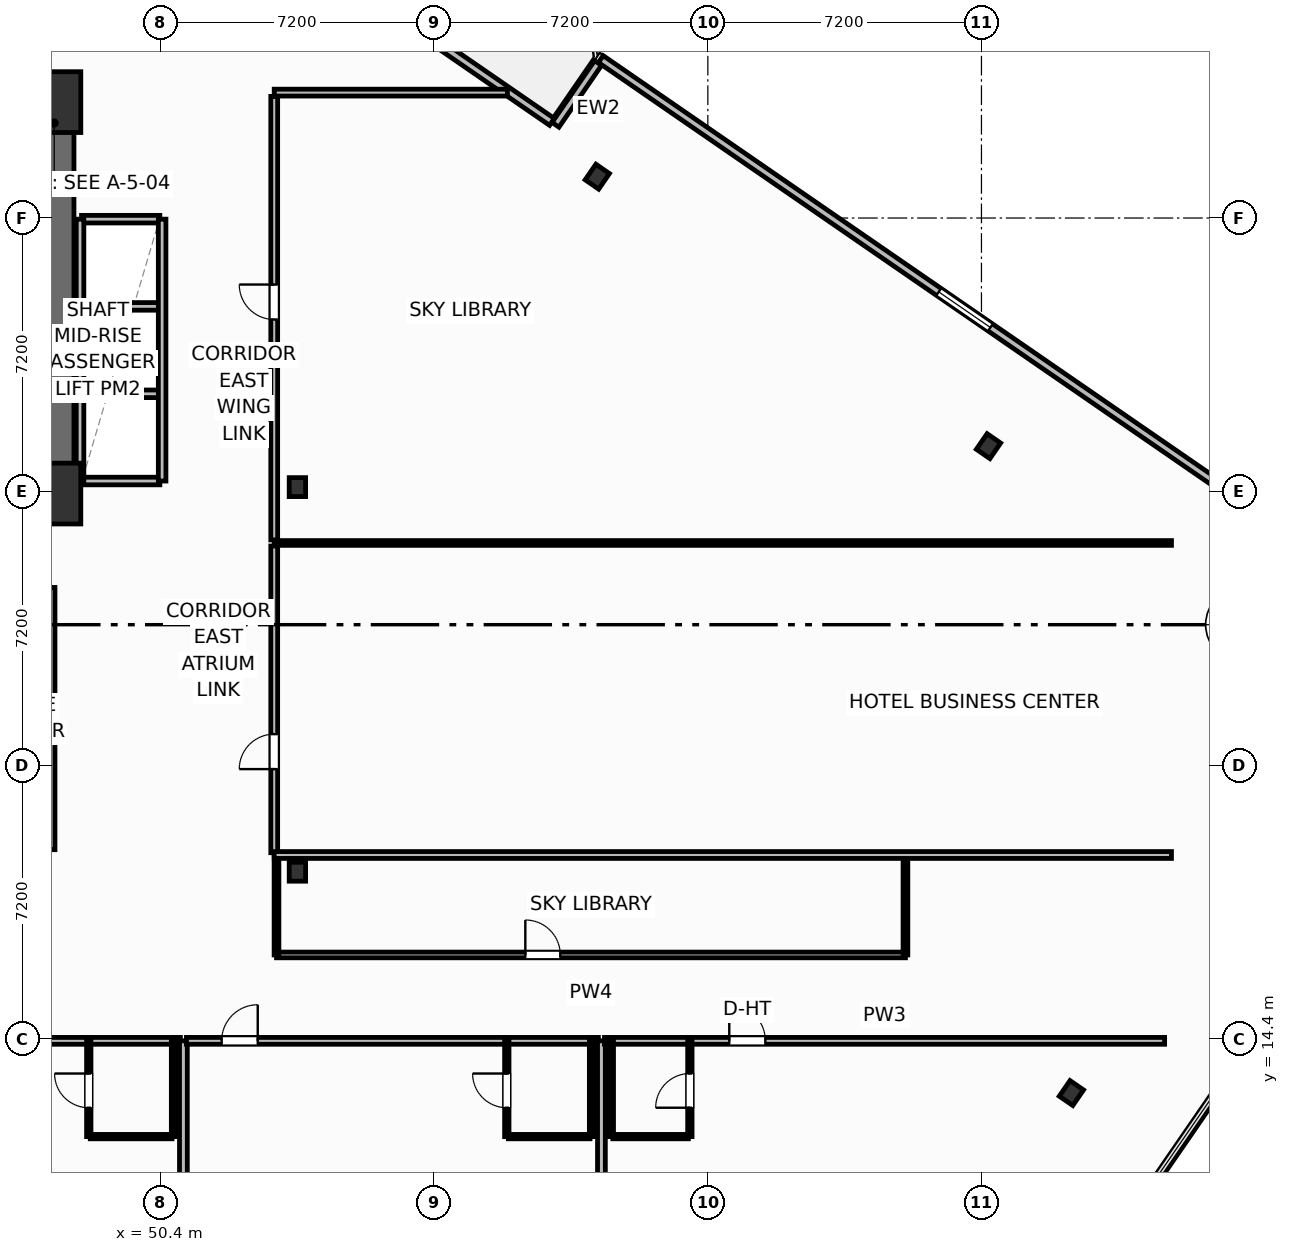
"""IFC4 building model, lengths in metres.
Left out: names, types, materials, properties, quantities, classifications, styles, units other than length and angle.
Written with IfcOpenShell. Run it as: python <this file> out.ifc"""

import sys

from ifc_helpers import new_model, si_unit, direction, frame, frame_2d, origin, origin_2d, place, context, subcontext, project, spatial, rectangle, i_section, extrude, element, fill, save


model = new_model("IFC4")
c1 = context("Model", 3, precision=1e-05, world=origin(), true_north=direction((0.0, 1.0)))
c2 = subcontext(c1, "Body", "Model", "MODEL_VIEW")
j1 = project(units=[si_unit("LENGTHUNIT", "METRE"), si_unit("PLANEANGLEUNIT", "RADIAN")], contexts=[c1])
p1 = place(None, origin())
s1 = spatial("IfcSite", under=j1, at=p1, CompositionType="ELEMENT")
p2 = place(p1, origin())
s2 = spatial("IfcBuilding", under=s1, at=p2, CompositionType="ELEMENT")
p3 = place(p2, frame((0.0, 0.0, 45.5)))
s3 = spatial("IfcBuildingStorey", under=s2, at=p3, CompositionType="ELEMENT", Elevation=45.5)
for number, where, z_axis, x_axis in (
    (1, (47.7, 28.75, 0.0), (0.0, 0.0, 1.0), (1.0, 0.0, 0.0)),
    (2, (47.7, 39.05, 0.0), (0.0, 0.0, 1.0), (1.0, 0.0, 0.0)),
):
    element("IfcColumn", number, at=place(p3, frame(where, z_axis=z_axis, x_axis=x_axis)), inside=s3, PredefinedType="COLUMN", context=c2, shape_type="SweptSolid", body=[
        extrude(rectangle(XDim=1.2, YDim=1.6, at=origin_2d()), origin(), (0.0, 0.0, 1.0), 3.7),
    ])
for number, where, z_axis, x_axis in (
    (3, (54.0, 18.8, 0.0), (0.0, 0.0, 1.0), (1.0, 0.0, 0.0)),
    (4, (54.0, 28.92, 0.0), (0.0, 0.0, 1.0), (1.0, 0.0, 0.0)),
):
    element("IfcColumn", number, at=place(p3, frame(where, z_axis=z_axis, x_axis=x_axis)), inside=s3, PredefinedType="COLUMN", context=c2, shape_type="SweptSolid", body=[
        extrude(i_section(OverallWidth=0.432, OverallDepth=0.498, WebThickness=0.056, FlangeThickness=0.089, FilletRadius=0.025, at=origin_2d()), origin(), (0.0, 0.0, 1.0), 3.7),
    ])
p4 = place(p3, frame((30.28, 38.845, 0.0), z_axis=(0.0, 0.0, 1.0), x_axis=(1.0, 0.0, 0.0)))
e5 = element("IfcWall", 5, at=p4, inside=s3, PredefinedType="SHEAR", context=c2, shape_type="SweptSolid", body=[
    extrude(rectangle(XDim=17.84, YDim=0.85, at=frame_2d((8.92, 0.0))), origin(), (0.0, 0.0, 1.0), 3.45),
])
p5 = place(p3, frame((47.695, 29.2, 0.0), z_axis=(0.0, 0.0, 1.0), x_axis=(0.0, 1.0, 0.0)))
e6 = element("IfcWall", 6, at=p5, inside=s3, PredefinedType="SHEAR", context=c2, shape_type="SweptSolid", body=[
    extrude(rectangle(XDim=9.22, YDim=0.85, at=frame_2d((4.61, 0.0))), origin(), (0.0, 0.0, 1.0), 3.45),
])
p6 = place(p3, frame((43.6, 28.775, 0.0), z_axis=(0.0, 0.0, 1.0), x_axis=(1.0, 0.0, 0.0)))
e7 = element("IfcWall", 7, at=p6, inside=s3, PredefinedType="SHEAR", context=c2, shape_type="SweptSolid", body=[
    extrude(rectangle(XDim=4.52, YDim=0.85, at=frame_2d((2.26, 0.0))), origin(), (0.0, 0.0, 1.0), 3.45),
])
for number, where, z_axis, x_axis in (
    (8, (74.367, 12.976, 0.0), (0.0, 0.0, 1.0), (0.824, -0.567, 0.0)),
    (9, (72.186, 29.997, 0.0), (0.0, 0.0, 1.0), (0.824, -0.567, 0.0)),
    (10, (61.891, 37.088, 0.0), (0.0, 0.0, 1.0), (0.824, -0.567, 0.0)),
):
    element("IfcColumn", number, at=place(p3, frame(where, z_axis=z_axis, x_axis=x_axis)), inside=s3, PredefinedType="COLUMN", context=c2, shape_type="SweptSolid", body=[
        extrude(i_section(OverallWidth=0.432, OverallDepth=0.498, WebThickness=0.056, FlangeThickness=0.089, FilletRadius=0.025, at=origin_2d()), origin(), (0.0, 0.0, 1.0), 3.7),
    ])
p7 = place(p3, frame((55.757, 41.933, 0.0), z_axis=(0.0, 0.0, 1.0), x_axis=(0.823534636215, -0.567265989598, 0.0)))
e11 = element("IfcWall", 11, at=p7, inside=s3, PredefinedType="SOLIDWALL", context=c2, shape_type="SweptSolid", body=[
    extrude(rectangle(XDim=6.0, YDim=0.22, at=frame_2d((3.0, 0.0))), origin(), (0.0, 0.0, 1.0), 2.73),
])
p8 = place(p7, frame((0.4, 0.0, 0.0)))
e12 = element("IfcOpeningElement", 12, at=p8, cuts=e11, PredefinedType="OPENING", context=c2, shape_type="SweptSolid", body=[
    extrude(rectangle(XDim=1.5, YDim=2.25, at=frame_2d((0.75, 1.125))), frame((0.0, 0.12, 0.0), z_axis=(0.0, -1.0, 0.0), x_axis=(1.0, 0.0, 0.0)), (0.0, 0.0, 1.0), 0.24),
])
p9 = place(p3, frame((81.127, 26.995, 0.0), z_axis=(0.0, 0.0, 1.0), x_axis=(-0.823530169317, 0.567272474411, 0.0)))
e13 = element("IfcWall", 13, at=p9, inside=s3, PredefinedType="SOLIDWALL", context=c2, shape_type="SweptSolid", body=[
    extrude(rectangle(XDim=23.247, YDim=0.22, at=frame_2d((11.624, 0.0))), origin(), (0.0, 0.0, 1.0), 2.73),
])
p10 = place(p9, frame((10.799, 0.0, 0.8)))
e14 = element("IfcOpeningElement", 14, at=p10, cuts=e13, PredefinedType="OPENING", context=c2, shape_type="SweptSolid", body=[
    extrude(rectangle(XDim=1.65, YDim=1.65, at=frame_2d((0.825, 0.825))), frame((0.0, 0.12, 0.0), z_axis=(0.0, -1.0, 0.0), x_axis=(1.0, 0.0, 0.0)), (0.0, 0.0, 1.0), 0.24),
])
p11 = place(p3, frame((61.912, 40.079, 0.0), z_axis=(0.0, 0.0, 1.0), x_axis=(-0.567189720735, -0.82358716642, 0.0)))
e15 = element("IfcWall", 15, at=p11, inside=s3, PredefinedType="SOLIDWALL", context=c2, shape_type="SweptSolid", body=[
    extrude(rectangle(XDim=1.975, YDim=0.22, at=frame_2d((0.987, 0.0))), origin(), (0.0, 0.0, 1.0), 2.73),
])
p12 = place(p3, frame((53.45, 16.61, 0.0), z_axis=(0.0, 0.0, 1.0), x_axis=(1.0, 0.0, 0.0)))
e16 = element("IfcWall", 16, at=p12, inside=s3, PredefinedType="PARTITIONING", context=c2, shape_type="SweptSolid", body=[
    extrude(rectangle(XDim=16.55, YDim=0.15, at=frame_2d((8.275, 0.0))), origin(), (0.0, 0.0, 1.0), 2.58),
])
p13 = place(p12, frame((6.548, 0.0, 0.0)))
e17 = element("IfcOpeningElement", 17, at=p13, cuts=e16, PredefinedType="OPENING", context=c2, shape_type="SweptSolid", body=[
    extrude(rectangle(XDim=0.92, YDim=2.05, at=frame_2d((0.46, 1.025))), frame((0.0, 0.085, 0.0), z_axis=(0.0, -1.0, 0.0), x_axis=(1.0, 0.0, 0.0)), (0.0, 0.0, 1.0), 0.17),
])
for number, where, z_axis, x_axis in (
    (18, (53.45, 16.61, 0.0), (0.0, 0.0, 1.0), (0.0, 1.0, 0.0)),
    (19, (70.0, 16.61, 0.0), (0.0, 0.0, 1.0), (0.0, 1.0, 0.0)),
):
    element("IfcWall", number, at=place(p3, frame(where, z_axis=z_axis, x_axis=x_axis)), inside=s3, PredefinedType="PARTITIONING", context=c2, shape_type="SweptSolid", body=[
        extrude(rectangle(XDim=2.63, YDim=0.125, at=frame_2d((1.315, 0.0))), origin(), (0.0, 0.0, 1.0), 3.45),
    ])
p14 = place(p3, frame((40.08, 14.35, 0.0), z_axis=(0.0, 0.0, 1.0), x_axis=(1.0, 0.0, 0.0)))
e20 = element("IfcWall", 20, at=p14, inside=s3, PredefinedType="PARTITIONING", context=c2, shape_type="SweptSolid", body=[
    extrude(rectangle(XDim=10.84, YDim=0.18, at=frame_2d((5.42, 0.0))), origin(), (0.0, 0.0, 1.0), 3.45),
])
p15 = place(p14, frame((0.926, 0.0, 0.0)))
e21 = element("IfcOpeningElement", 21, at=p15, cuts=e20, PredefinedType="OPENING", context=c2, shape_type="SweptSolid", body=[
    extrude(rectangle(XDim=0.95, YDim=2.15, at=frame_2d((0.475, 1.075))), frame((0.0, 0.1, 0.0), z_axis=(0.0, -1.0, 0.0), x_axis=(1.0, 0.0, 0.0)), (0.0, 0.0, 1.0), 0.2),
])
p16 = place(p3, frame((48.55, 11.83, 0.0), z_axis=(0.0, 0.0, 1.0), x_axis=(1.0, 0.0, 0.0)))
e22 = element("IfcWall", 22, at=p16, inside=s3, PredefinedType="PARTITIONING", context=c2, shape_type="SweptSolid", body=[
    extrude(rectangle(XDim=2.15, YDim=0.115, at=frame_2d((1.075, 0.0))), origin(), (0.0, 0.0, 1.0), 3.45),
])
p17 = place(p3, frame((48.51, 11.83, 0.0), z_axis=(0.0, 0.0, 1.0), x_axis=(0.0, 1.0, 0.0)))
e23 = element("IfcWall", 23, at=p17, inside=s3, PredefinedType="PARTITIONING", context=c2, shape_type="SweptSolid", body=[
    extrude(rectangle(XDim=2.52, YDim=0.115, at=frame_2d((1.26, 0.0))), origin(), (0.0, 0.0, 1.0), 3.45),
])
p18 = place(p17, frame((0.76, 0.0, 0.0)))
e24 = element("IfcOpeningElement", 24, at=p18, cuts=e23, PredefinedType="OPENING", context=c2, shape_type="SweptSolid", body=[
    extrude(rectangle(XDim=0.9, YDim=2.05, at=frame_2d((0.45, 1.025))), frame((0.0, 0.067, 0.0), z_axis=(0.0, -1.0, 0.0), x_axis=(1.0, 0.0, 0.0)), (0.0, 0.0, 1.0), 0.135),
])
p19 = place(p3, frame((50.74, 11.83, 0.0), z_axis=(0.0, 0.0, 1.0), x_axis=(0.0, 1.0, 0.0)))
e25 = element("IfcWall", 25, at=p19, inside=s3, PredefinedType="PARTITIONING", context=c2, shape_type="SweptSolid", body=[
    extrude(rectangle(XDim=2.52, YDim=0.115, at=frame_2d((1.26, 0.0))), origin(), (0.0, 0.0, 1.0), 3.45),
])
p20 = place(p3, frame((51.0, -4.0, 0.0), z_axis=(0.0, 0.0, 1.0), x_axis=(0.0, 1.0, 0.0)))
e26 = element("IfcWall", 26, at=p20, inside=s3, PredefinedType="PARTITIONING", context=c2, shape_type="SweptSolid", body=[
    extrude(rectangle(XDim=18.35, YDim=0.205, at=frame_2d((9.175, 0.0))), origin(), (0.0, 0.0, 1.0), 3.45),
])
p21 = place(p3, frame((51.08, 14.35, 0.0), z_axis=(0.0, 0.0, 1.0), x_axis=(1.0, 0.0, 0.0)))
e27 = element("IfcWall", 27, at=p21, inside=s3, PredefinedType="PARTITIONING", context=c2, shape_type="SweptSolid", body=[
    extrude(rectangle(XDim=10.84, YDim=0.18, at=frame_2d((5.42, 0.0))), origin(), (0.0, 0.0, 1.0), 3.45),
])
p22 = place(p21, frame((0.926, 0.0, 0.0)))
e28 = element("IfcOpeningElement", 28, at=p22, cuts=e27, PredefinedType="OPENING", context=c2, shape_type="SweptSolid", body=[
    extrude(rectangle(XDim=0.95, YDim=2.15, at=frame_2d((0.475, 1.075))), frame((0.0, 0.1, 0.0), z_axis=(0.0, -1.0, 0.0), x_axis=(1.0, 0.0, 0.0)), (0.0, 0.0, 1.0), 0.2),
])
p23 = place(p3, frame((59.55, 11.83, 0.0), z_axis=(0.0, 0.0, 1.0), x_axis=(1.0, 0.0, 0.0)))
e29 = element("IfcWall", 29, at=p23, inside=s3, PredefinedType="PARTITIONING", context=c2, shape_type="SweptSolid", body=[
    extrude(rectangle(XDim=2.15, YDim=0.115, at=frame_2d((1.075, 0.0))), origin(), (0.0, 0.0, 1.0), 3.45),
])
p24 = place(p3, frame((59.51, 11.83, 0.0), z_axis=(0.0, 0.0, 1.0), x_axis=(0.0, 1.0, 0.0)))
e30 = element("IfcWall", 30, at=p24, inside=s3, PredefinedType="PARTITIONING", context=c2, shape_type="SweptSolid", body=[
    extrude(rectangle(XDim=2.52, YDim=0.115, at=frame_2d((1.26, 0.0))), origin(), (0.0, 0.0, 1.0), 3.45),
])
p25 = place(p24, frame((0.76, 0.0, 0.0)))
e31 = element("IfcOpeningElement", 31, at=p25, cuts=e30, PredefinedType="OPENING", context=c2, shape_type="SweptSolid", body=[
    extrude(rectangle(XDim=0.9, YDim=2.05, at=frame_2d((0.45, 1.025))), frame((0.0, 0.067, 0.0), z_axis=(0.0, -1.0, 0.0), x_axis=(1.0, 0.0, 0.0)), (0.0, 0.0, 1.0), 0.135),
])
p26 = place(p3, frame((61.74, 11.83, 0.0), z_axis=(0.0, 0.0, 1.0), x_axis=(0.0, 1.0, 0.0)))
e32 = element("IfcWall", 32, at=p26, inside=s3, PredefinedType="PARTITIONING", context=c2, shape_type="SweptSolid", body=[
    extrude(rectangle(XDim=2.52, YDim=0.115, at=frame_2d((1.26, 0.0))), origin(), (0.0, 0.0, 1.0), 3.45),
])
p27 = place(p3, frame((62.0, -4.0, 0.0), z_axis=(0.0, 0.0, 1.0), x_axis=(0.0, 1.0, 0.0)))
e33 = element("IfcWall", 33, at=p27, inside=s3, PredefinedType="PARTITIONING", context=c2, shape_type="SweptSolid", body=[
    extrude(rectangle(XDim=18.35, YDim=0.205, at=frame_2d((9.175, 0.0))), origin(), (0.0, 0.0, 1.0), 3.45),
])
p28 = place(p3, frame((62.08, 14.35, 0.0), z_axis=(0.0, 0.0, 1.0), x_axis=(1.0, 0.0, 0.0)))
e34 = element("IfcWall", 34, at=p28, inside=s3, PredefinedType="PARTITIONING", context=c2, shape_type="SweptSolid", body=[
    extrude(rectangle(XDim=14.74, YDim=0.18, at=frame_2d((7.37, 0.0))), origin(), (0.0, 0.0, 1.0), 2.58),
])
p29 = place(p28, frame((3.284, 0.0, 0.0)))
e35 = element("IfcOpeningElement", 35, at=p29, cuts=e34, PredefinedType="OPENING", context=c2, shape_type="SweptSolid", body=[
    extrude(rectangle(XDim=0.95, YDim=2.15, at=frame_2d((0.475, 1.075))), frame((0.0, 0.1, 0.0), z_axis=(0.0, -1.0, 0.0), x_axis=(1.0, 0.0, 0.0)), (0.0, 0.0, 1.0), 0.2),
])
p30 = place(p3, frame((62.3, 11.83, 0.0), z_axis=(0.0, 0.0, 1.0), x_axis=(1.0, 0.0, 0.0)))
e36 = element("IfcWall", 36, at=p30, inside=s3, PredefinedType="PARTITIONING", context=c2, shape_type="SweptSolid", body=[
    extrude(rectangle(XDim=1.987, YDim=0.115, at=frame_2d((0.994, 0.0))), origin(), (0.0, 0.0, 1.0), 3.45),
])
p31 = place(p3, frame((64.327, 11.83, 0.0), z_axis=(0.0, 0.0, 1.0), x_axis=(0.0, 1.0, 0.0)))
e37 = element("IfcWall", 37, at=p31, inside=s3, PredefinedType="PARTITIONING", context=c2, shape_type="SweptSolid", body=[
    extrude(rectangle(XDim=2.52, YDim=0.115, at=frame_2d((1.26, 0.0))), origin(), (0.0, 0.0, 1.0), 3.45),
])
p32 = place(p31, frame((0.76, 0.0, 0.0)))
e38 = element("IfcOpeningElement", 38, at=p32, cuts=e37, PredefinedType="OPENING", context=c2, shape_type="SweptSolid", body=[
    extrude(rectangle(XDim=0.9, YDim=2.05, at=frame_2d((0.45, 1.025))), frame((0.0, 0.067, 0.0), z_axis=(0.0, -1.0, 0.0), x_axis=(1.0, 0.0, 0.0)), (0.0, 0.0, 1.0), 0.135),
])
p33 = place(p3, frame((62.26, 11.83, 0.0), z_axis=(0.0, 0.0, 1.0), x_axis=(0.0, 1.0, 0.0)))
e39 = element("IfcWall", 39, at=p33, inside=s3, PredefinedType="PARTITIONING", context=c2, shape_type="SweptSolid", body=[
    extrude(rectangle(XDim=2.52, YDim=0.115, at=frame_2d((1.26, 0.0))), origin(), (0.0, 0.0, 1.0), 3.45),
])
p34 = place(p3, frame((53.39, 19.3, 0.0), z_axis=(0.0, 0.0, 1.0), x_axis=(0.0, 1.0, 0.0)))
e40 = element("IfcWall", 40, at=p34, inside=s3, PredefinedType="PARTITIONING", context=c2, shape_type="SweptSolid", body=[
    extrude(rectangle(XDim=8.07, YDim=0.18, at=frame_2d((4.035, 0.0))), origin(), (0.0, 0.0, 1.0), 3.45),
])
p35 = place(p34, frame((2.2, 0.0, 0.0)))
e41 = element("IfcOpeningElement", 41, at=p35, cuts=e40, PredefinedType="OPENING", context=c2, shape_type="SweptSolid", body=[
    extrude(rectangle(XDim=0.92, YDim=2.05, at=frame_2d((0.46, 1.025))), frame((0.0, 0.1, 0.0), z_axis=(0.0, -1.0, 0.0), x_axis=(1.0, 0.0, 0.0)), (0.0, 0.0, 1.0), 0.2),
])
p36 = place(p3, frame((53.39, 27.53, 0.0), z_axis=(0.0, 0.0, 1.0), x_axis=(0.0, 1.0, 0.0)))
e42 = element("IfcWall", 42, at=p36, inside=s3, PredefinedType="PARTITIONING", context=c2, shape_type="SweptSolid", body=[
    extrude(rectangle(XDim=11.67, YDim=0.18, at=frame_2d((5.835, 0.0))), origin(), (0.0, 0.0, 1.0), 3.45),
])
p37 = place(p36, frame((5.8, 0.0, 0.0)))
e43 = element("IfcOpeningElement", 43, at=p37, cuts=e42, PredefinedType="OPENING", context=c2, shape_type="SweptSolid", body=[
    extrude(rectangle(XDim=0.92, YDim=2.05, at=frame_2d((0.46, 1.025))), frame((0.0, 0.1, 0.0), z_axis=(0.0, -1.0, 0.0), x_axis=(1.0, 0.0, 0.0)), (0.0, 0.0, 1.0), 0.2),
])
p38 = place(p3, frame((53.39, 27.45, 0.0), z_axis=(0.0, 0.0, 1.0), x_axis=(1.0, 0.0, 0.0)))
e44 = element("IfcWall", 44, at=p38, inside=s3, PredefinedType="PARTITIONING", context=c2, shape_type="SweptSolid", body=[
    extrude(rectangle(XDim=23.61, YDim=0.125, at=frame_2d((11.805, 0.0))), origin(), (0.0, 0.0, 1.0), 3.45),
])
p39 = place(p3, frame((53.39, 19.24, 0.0), z_axis=(0.0, 0.0, 1.0), x_axis=(1.0, 0.0, 0.0)))
e45 = element("IfcWall", 45, at=p39, inside=s3, PredefinedType="PARTITIONING", context=c2, shape_type="SweptSolid", body=[
    extrude(rectangle(XDim=23.61, YDim=0.18, at=frame_2d((11.805, 0.0))), origin(), (0.0, 0.0, 1.0), 3.45),
])
p40 = place(p3, frame((53.39, 39.3, 0.0), z_axis=(0.0, 0.0, 1.0), x_axis=(1.0, 0.0, 0.0)))
e46 = element("IfcWall", 46, at=p40, inside=s3, PredefinedType="PARTITIONING", context=c2, shape_type="SweptSolid", body=[
    extrude(rectangle(XDim=6.136, YDim=0.18, at=frame_2d((3.068, 0.0))), origin(), (0.0, 0.0, 1.0), 3.45),
])
for number, where, z_axis, x_axis in (
    (47, (48.32, 31.375, 0.0), (0.0, 0.0, 1.0), (1.0, 0.0, 0.0)),
    (48, (48.32, 33.675, 0.0), (0.0, 0.0, 1.0), (1.0, 0.0, 0.0)),
):
    element("IfcWall", number, at=place(p3, frame(where, z_axis=z_axis, x_axis=x_axis)), inside=s3, PredefinedType="PARTITIONING", context=c2, shape_type="SweptSolid", body=[
        extrude(rectangle(XDim=2.06, YDim=0.2, at=frame_2d((1.03, 0.0))), origin(), (0.0, 0.0, 1.0), 3.45),
    ])
p41 = place(p3, frame((48.32, 29.08, 0.0), z_axis=(0.0, 0.0, 1.0), x_axis=(1.0, 0.0, 0.0)))
e49 = element("IfcWall", 49, at=p41, inside=s3, PredefinedType="PARTITIONING", context=c2, shape_type="SweptSolid", body=[
    extrude(rectangle(XDim=2.06, YDim=0.2, at=frame_2d((1.03, 0.0))), origin(), (0.0, 0.0, 1.0), 2.662),
])
p42 = place(p3, frame((48.32, 35.97, 0.0), z_axis=(0.0, 0.0, 1.0), x_axis=(1.0, 0.0, 0.0)))
e50 = element("IfcWall", 50, at=p42, inside=s3, PredefinedType="PARTITIONING", context=c2, shape_type="SweptSolid", body=[
    extrude(rectangle(XDim=2.06, YDim=0.2, at=frame_2d((1.03, 0.0))), origin(), (0.0, 0.0, 1.0), 3.45),
])
for number, where, z_axis, x_axis in (
    (51, (48.28, 29.08, 0.0), (0.0, 0.0, 1.0), (0.0, 1.0, 0.0)),
    (52, (50.44, 29.08, 0.0), (0.0, 0.0, 1.0), (0.0, 1.0, 0.0)),
):
    element("IfcWall", number, at=place(p3, frame(where, z_axis=z_axis, x_axis=x_axis)), inside=s3, PredefinedType="PARTITIONING", context=c2, shape_type="SweptSolid", body=[
        extrude(rectangle(XDim=6.89, YDim=0.2, at=frame_2d((3.445, 0.0))), origin(), (0.0, 0.0, 1.0), 3.45),
    ])
p43 = place(p3, frame((47.52, 19.38, 0.0), z_axis=(0.0, 0.0, 1.0), x_axis=(0.0, 1.0, 0.0)))
e53 = element("IfcWall", 53, at=p43, inside=s3, PredefinedType="PARTITIONING", context=c2, shape_type="SweptSolid", body=[
    extrude(rectangle(XDim=6.9, YDim=0.2, at=frame_2d((3.45, 0.0))), origin(), (0.0, 0.0, 1.0), 3.45),
])
p44 = place(p10, origin())
e54 = element("IfcWindow", 54, at=p44, inside=s3, PartitioningType="SINGLE_PANEL", PredefinedType="WINDOW", context=c2, shape_type="SweptSolid", body=[
    extrude(rectangle(XDim=1.65, YDim=1.65, at=frame_2d((0.825, 0.825))), frame((0.0, 0.03, 0.0), z_axis=(0.0, -1.0, 0.0), x_axis=(1.0, 0.0, 0.0)), (0.0, 0.0, 1.0), 0.06),
])
fill(e14, e54)
p45 = place(p13, origin())
e55 = element("IfcDoor", 55, at=p45, inside=s3, OperationType="SINGLE_SWING_LEFT", PredefinedType="DOOR", context=c2, shape_type="SweptSolid", body=[
    extrude(rectangle(XDim=0.92, YDim=2.05, at=frame_2d((0.46, 1.025))), frame((0.0, 0.025, 0.0), z_axis=(0.0, -1.0, 0.0), x_axis=(1.0, 0.0, 0.0)), (0.0, 0.0, 1.0), 0.05),
])
fill(e17, e55)
p46 = place(p18, origin())
e56 = element("IfcDoor", 56, at=p46, inside=s3, OperationType="SINGLE_SWING_RIGHT", PredefinedType="DOOR", context=c2, shape_type="SweptSolid", body=[
    extrude(rectangle(XDim=0.9, YDim=2.05, at=frame_2d((0.45, 1.025))), frame((0.0, 0.025, 0.0), z_axis=(0.0, -1.0, 0.0), x_axis=(1.0, 0.0, 0.0)), (0.0, 0.0, 1.0), 0.05),
])
fill(e24, e56)
p47 = place(p22, origin())
e57 = element("IfcDoor", 57, at=p47, inside=s3, OperationType="SINGLE_SWING_RIGHT", PredefinedType="DOOR", context=c2, shape_type="SweptSolid", body=[
    extrude(rectangle(XDim=0.95, YDim=2.15, at=frame_2d((0.475, 1.075))), frame((0.0, 0.025, 0.0), z_axis=(0.0, -1.0, 0.0), x_axis=(1.0, 0.0, 0.0)), (0.0, 0.0, 1.0), 0.05),
])
fill(e28, e57)
p48 = place(p25, origin())
e58 = element("IfcDoor", 58, at=p48, inside=s3, OperationType="SINGLE_SWING_RIGHT", PredefinedType="DOOR", context=c2, shape_type="SweptSolid", body=[
    extrude(rectangle(XDim=0.9, YDim=2.05, at=frame_2d((0.45, 1.025))), frame((0.0, 0.025, 0.0), z_axis=(0.0, -1.0, 0.0), x_axis=(1.0, 0.0, 0.0)), (0.0, 0.0, 1.0), 0.05),
])
fill(e31, e58)
p49 = place(p29, origin())
e59 = element("IfcDoor", 59, at=p49, inside=s3, OperationType="SINGLE_SWING_LEFT", PredefinedType="DOOR", context=c2, shape_type="SweptSolid", body=[
    extrude(rectangle(XDim=0.95, YDim=2.15, at=frame_2d((0.475, 1.075))), frame((0.0, 0.025, 0.0), z_axis=(0.0, -1.0, 0.0), x_axis=(1.0, 0.0, 0.0)), (0.0, 0.0, 1.0), 0.05),
])
fill(e35, e59)
p50 = place(p32, origin())
e60 = element("IfcDoor", 60, at=p50, inside=s3, OperationType="SINGLE_SWING_LEFT", PredefinedType="DOOR", context=c2, shape_type="SweptSolid", body=[
    extrude(rectangle(XDim=0.9, YDim=2.05, at=frame_2d((0.45, 1.025))), frame((0.0, 0.025, 0.0), z_axis=(0.0, -1.0, 0.0), x_axis=(1.0, 0.0, 0.0)), (0.0, 0.0, 1.0), 0.05),
])
fill(e38, e60)
p51 = place(p35, origin())
e61 = element("IfcDoor", 61, at=p51, inside=s3, OperationType="SINGLE_SWING_LEFT", PredefinedType="DOOR", context=c2, shape_type="SweptSolid", body=[
    extrude(rectangle(XDim=0.92, YDim=2.05, at=frame_2d((0.46, 1.025))), frame((0.0, 0.025, 0.0), z_axis=(0.0, -1.0, 0.0), x_axis=(1.0, 0.0, 0.0)), (0.0, 0.0, 1.0), 0.05),
])
fill(e41, e61)
p52 = place(p37, origin())
e62 = element("IfcDoor", 62, at=p52, inside=s3, OperationType="SINGLE_SWING_RIGHT", PredefinedType="DOOR", context=c2, shape_type="SweptSolid", body=[
    extrude(rectangle(XDim=0.92, YDim=2.05, at=frame_2d((0.46, 1.025))), frame((0.0, 0.025, 0.0), z_axis=(0.0, -1.0, 0.0), x_axis=(1.0, 0.0, 0.0)), (0.0, 0.0, 1.0), 0.05),
])
fill(e43, e62)
save(model, sys.argv[1])
